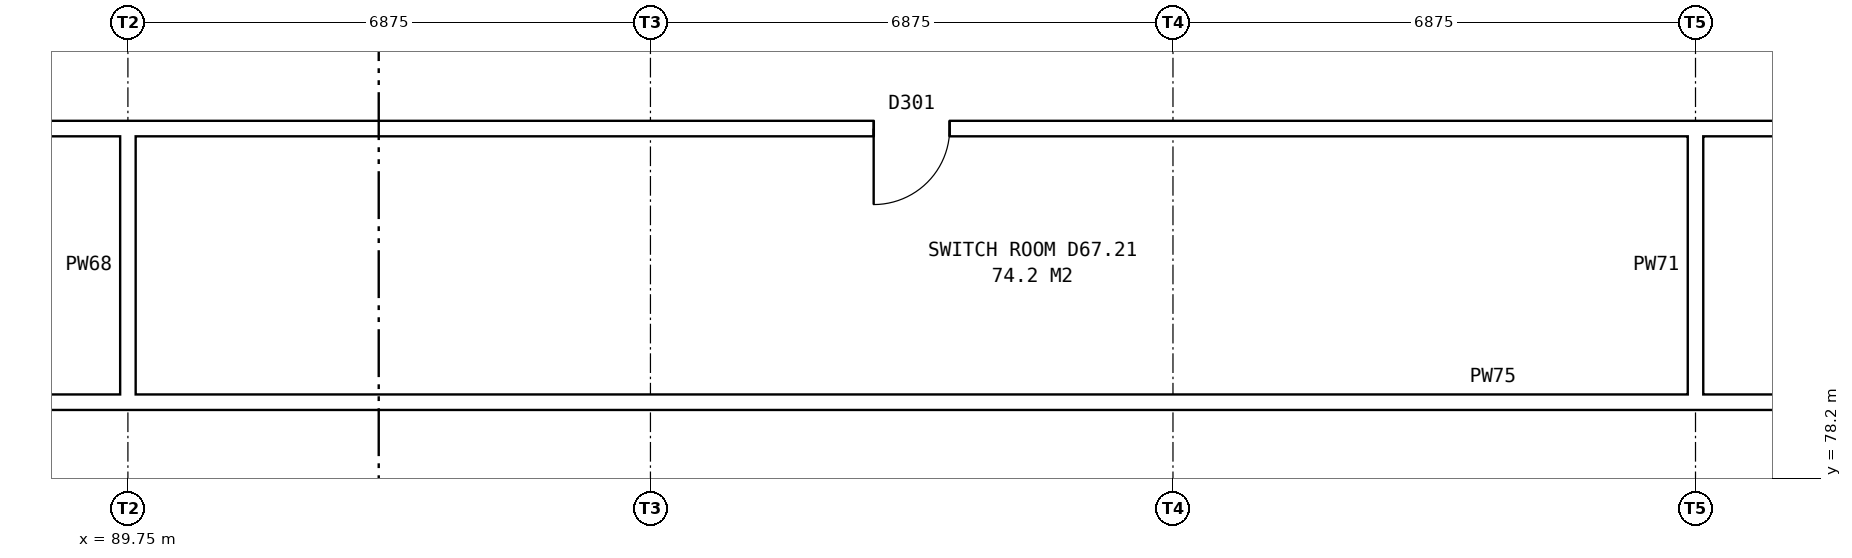
"""IFC4 building model, lengths in metres.
Left out: names, types, materials, properties, quantities, classifications, styles, units other than length and angle.
Written with IfcOpenShell. Run it as: python <this file> out.ifc"""

import sys

from ifc_helpers import new_model, si_unit, direction, frame, frame_2d, origin, place, context, subcontext, project, spatial, rectangle, extrude, element, fill, save


model = new_model("IFC4")
c1 = context("Model", 3, precision=1e-05, world=origin(), true_north=direction((0.0, 1.0)))
c2 = subcontext(c1, "Body", "Model", "MODEL_VIEW")
j1 = project(units=[si_unit("LENGTHUNIT", "METRE"), si_unit("PLANEANGLEUNIT", "RADIAN")], contexts=[c1])
p1 = place(None, origin())
s1 = spatial("IfcSite", under=j1, at=p1, CompositionType="ELEMENT")
p2 = place(p1, origin())
s2 = spatial("IfcBuilding", under=s1, at=p2, CompositionType="ELEMENT")
p3 = place(p2, frame((0.0, 0.0, 236.9)))
s3 = spatial("IfcBuildingStorey", under=s2, at=p3, CompositionType="ELEMENT", Elevation=236.9)
p4 = place(p3, frame((46.66, 79.2, 0.0), z_axis=(0.0, 0.0, 1.0), x_axis=(1.0, 0.0, 0.0)))
e1 = element("IfcWall", 1, at=p4, inside=s3, PredefinedType="PARTITIONING", context=c2, shape_type="SweptSolid", body=[
    extrude(rectangle(XDim=122.1, YDim=0.2, at=frame_2d((61.05, 0.0))), origin(), (0.0, 0.0, 1.0), 6.7),
])
p5 = place(p3, frame((46.66, 82.8, 0.0), z_axis=(0.0, 0.0, 1.0), x_axis=(1.0, 0.0, 0.0)))
e2 = element("IfcWall", 2, at=p5, inside=s3, PredefinedType="PARTITIONING", context=c2, shape_type="SweptSolid", body=[
    extrude(rectangle(XDim=122.1, YDim=0.2, at=frame_2d((61.05, 0.0))), origin(), (0.0, 0.0, 1.0), 6.7),
])
p6 = place(p5, frame((5.22, 0.0, 0.0)))
e3 = element("IfcOpeningElement", 3, at=p6, cuts=e2, PredefinedType="OPENING", context=c2, shape_type="SweptSolid", body=[
    extrude(rectangle(XDim=1.0, YDim=2.1, at=frame_2d((0.5, 1.05))), frame((0.0, 0.11, 0.0), z_axis=(0.0, -1.0, 0.0), x_axis=(1.0, 0.0, 0.0)), (0.0, 0.0, 1.0), 0.22),
])
p7 = place(p5, frame((16.84, 0.0, 0.0)))
e4 = element("IfcOpeningElement", 4, at=p7, cuts=e2, PredefinedType="OPENING", context=c2, shape_type="SweptSolid", body=[
    extrude(rectangle(XDim=1.0, YDim=2.1, at=frame_2d((0.5, 1.05))), frame((0.0, 0.11, 0.0), z_axis=(0.0, -1.0, 0.0), x_axis=(1.0, 0.0, 0.0)), (0.0, 0.0, 1.0), 0.22),
])
p8 = place(p5, frame((25.66, 0.0, 0.0)))
e5 = element("IfcOpeningElement", 5, at=p8, cuts=e2, PredefinedType="OPENING", context=c2, shape_type="SweptSolid", body=[
    extrude(rectangle(XDim=1.0, YDim=2.1, at=frame_2d((0.5, 1.05))), frame((0.0, 0.11, 0.0), z_axis=(0.0, -1.0, 0.0), x_axis=(1.0, 0.0, 0.0)), (0.0, 0.0, 1.0), 0.22),
])
p9 = place(p5, frame((35.535, 0.0, 0.0)))
e6 = element("IfcOpeningElement", 6, at=p9, cuts=e2, PredefinedType="OPENING", context=c2, shape_type="SweptSolid", body=[
    extrude(rectangle(XDim=1.0, YDim=2.1, at=frame_2d((0.5, 1.05))), frame((0.0, 0.11, 0.0), z_axis=(0.0, -1.0, 0.0), x_axis=(1.0, 0.0, 0.0)), (0.0, 0.0, 1.0), 0.22),
])
p10 = place(p5, frame((52.902, 0.0, 0.0)))
e7 = element("IfcOpeningElement", 7, at=p10, cuts=e2, PredefinedType="OPENING", context=c2, shape_type="SweptSolid", body=[
    extrude(rectangle(XDim=1.0, YDim=2.1, at=frame_2d((0.5, 1.05))), frame((0.0, 0.11, 0.0), z_axis=(0.0, -1.0, 0.0), x_axis=(1.0, 0.0, 0.0)), (0.0, 0.0, 1.0), 0.22),
])
p11 = place(p5, frame((73.708, 0.0, 0.0)))
e8 = element("IfcOpeningElement", 8, at=p11, cuts=e2, PredefinedType="OPENING", context=c2, shape_type="SweptSolid", body=[
    extrude(rectangle(XDim=1.0, YDim=2.1, at=frame_2d((0.5, 1.05))), frame((0.0, 0.11, 0.0), z_axis=(0.0, -1.0, 0.0), x_axis=(1.0, 0.0, 0.0)), (0.0, 0.0, 1.0), 0.22),
])
p12 = place(p5, frame((90.02, 0.0, 0.0)))
e9 = element("IfcOpeningElement", 9, at=p12, cuts=e2, PredefinedType="OPENING", context=c2, shape_type="SweptSolid", body=[
    extrude(rectangle(XDim=1.0, YDim=2.1, at=frame_2d((0.5, 1.05))), frame((0.0, 0.11, 0.0), z_axis=(0.0, -1.0, 0.0), x_axis=(1.0, 0.0, 0.0)), (0.0, 0.0, 1.0), 0.22),
])
p13 = place(p5, frame((101.84, 0.0, 0.0)))
e10 = element("IfcOpeningElement", 10, at=p13, cuts=e2, PredefinedType="OPENING", context=c2, shape_type="SweptSolid", body=[
    extrude(rectangle(XDim=1.0, YDim=2.1, at=frame_2d((0.5, 1.05))), frame((0.0, 0.11, 0.0), z_axis=(0.0, -1.0, 0.0), x_axis=(1.0, 0.0, 0.0)), (0.0, 0.0, 1.0), 0.22),
])
p14 = place(p5, frame((114.66, 0.0, 0.0)))
e11 = element("IfcOpeningElement", 11, at=p14, cuts=e2, PredefinedType="OPENING", context=c2, shape_type="SweptSolid", body=[
    extrude(rectangle(XDim=1.0, YDim=2.1, at=frame_2d((0.5, 1.05))), frame((0.0, 0.11, 0.0), z_axis=(0.0, -1.0, 0.0), x_axis=(1.0, 0.0, 0.0)), (0.0, 0.0, 1.0), 0.22),
])
for number, where, z_axis, x_axis in (
    (12, (89.75, 79.1, 0.0), (0.0, 0.0, 1.0), (0.0, 1.0, 0.0)),
    (13, (110.375, 79.1, 0.0), (0.0, 0.0, 1.0), (0.0, 1.0, 0.0)),
):
    element("IfcWall", number, at=place(p3, frame(where, z_axis=z_axis, x_axis=x_axis)), inside=s3, PredefinedType="PARTITIONING", context=c2, shape_type="SweptSolid", body=[
        extrude(rectangle(XDim=3.8, YDim=0.2, at=frame_2d((1.9, 0.0))), origin(), (0.0, 0.0, 1.0), 6.167),
    ])
p15 = place(p10, frame((1.0, 0.0, 0.0), z_axis=(0.0, 0.0, 1.0), x_axis=(-1.0, 0.0, 0.0)))
e14 = element("IfcDoor", 14, at=p15, inside=s3, OperationType="SINGLE_SWING_RIGHT", PredefinedType="DOOR", context=c2, shape_type="SweptSolid", body=[
    extrude(rectangle(XDim=1.0, YDim=2.1, at=frame_2d((0.5, 1.05))), frame((0.0, 0.025, 0.0), z_axis=(0.0, -1.0, 0.0), x_axis=(1.0, 0.0, 0.0)), (0.0, 0.0, 1.0), 0.05),
])
fill(e7, e14)
save(model, sys.argv[1])
